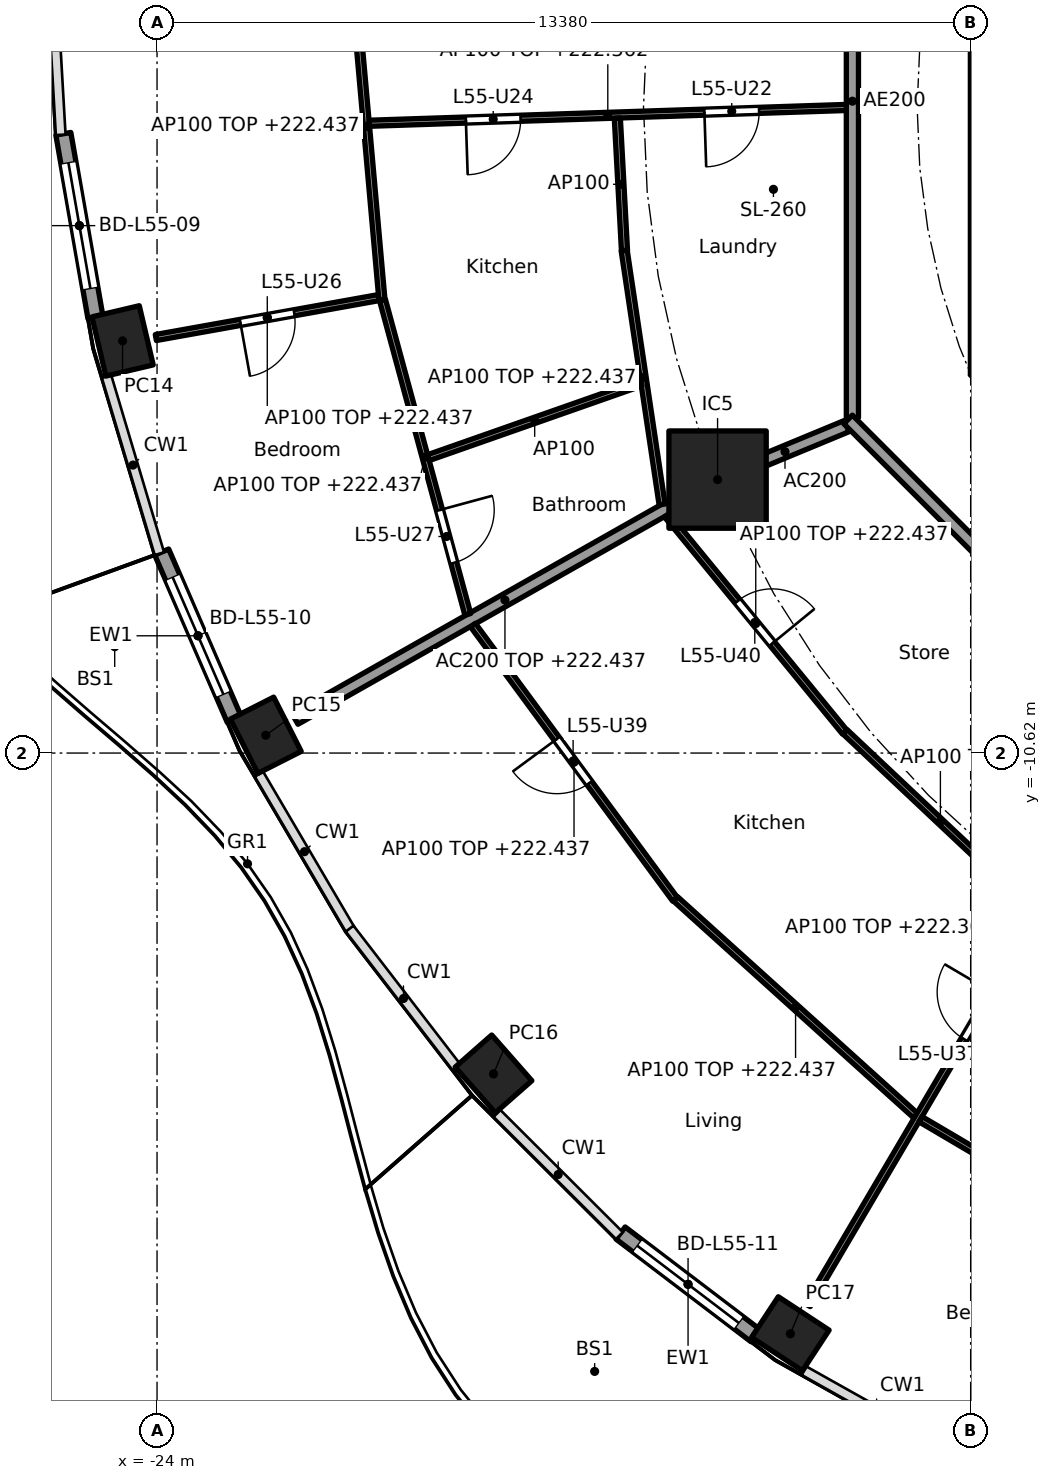
"""IFC4 building model, lengths in metres.
Left out: names, types, materials, properties, quantities, classifications, styles, units other than length and angle.
Written with IfcOpenShell. Run it as: python <this file> out.ifc"""

import sys

from ifc_helpers import new_model, si_unit, direction, frame, frame_2d, origin, origin_2d, place, context, subcontext, project, spatial, polyline, rectangle, hollow_rectangle, outline, extrude, element, fill, save


model = new_model("IFC4")
c1 = context("Model", 3, precision=1e-05, world=origin(), true_north=direction((0.0, 1.0)))
c2 = subcontext(c1, "Body", "Model", "MODEL_VIEW")
j1 = project(units=[si_unit("LENGTHUNIT", "METRE"), si_unit("PLANEANGLEUNIT", "RADIAN")], contexts=[c1])
p1 = place(None, origin())
s1 = spatial("IfcSite", under=j1, at=p1, CompositionType="ELEMENT")
p2 = place(p1, origin())
s2 = spatial("IfcBuilding", under=s1, at=p2, CompositionType="ELEMENT")
p3 = place(p2, frame((0.0, 0.0, 219.6)))
s3 = spatial("IfcBuildingStorey", under=s2, at=p3, CompositionType="ELEMENT", Elevation=219.6)
for number, where, z_axis, x_axis in (
    (1, (-24.567, -3.842, 0.0), (0.0, 0.0, 1.0), (0.229, -0.973, 0.0)),
    (2, (-22.212, -10.327, 0.0), (0.0, 0.0, 1.0), (0.452, -0.892, 0.0)),
    (3, (-18.467, -15.896, 0.0), (0.0, 0.0, 1.0), (0.66, -0.751, 0.0)),
    (4, (-13.585, -20.17, 0.0), (0.0, 0.0, 1.0), (0.836, -0.549, 0.0)),
):
    element("IfcColumn", number, at=place(p3, frame(where, z_axis=z_axis, x_axis=x_axis)), inside=s3, PredefinedType="COLUMN", context=c2, shape_type="SweptSolid", body=[
        extrude(hollow_rectangle(XDim=1.0, YDim=0.8, WallThickness=0.032, at=origin_2d()), origin(), (0.0, 0.0, 1.0), 3.7),
    ])
p4 = place(p3, frame((-14.782, -6.123, 0.0), z_axis=(0.0, 0.0, 1.0), x_axis=(1.0, 0.0, 0.0)))
e5 = element("IfcColumn", 5, at=p4, inside=s3, PredefinedType="COLUMN", context=c2, shape_type="SweptSolid", body=[
    extrude(rectangle(XDim=1.6, YDim=1.6, at=origin_2d()), origin(), (0.0, 0.0, 1.0), 3.7),
])
p5 = place(p3, frame((-25.013, -3.457, 0.0), z_axis=(0.0, 0.0, 1.0), x_axis=(-0.172241318156, 0.985054784426, 0.0)))
e6 = element("IfcWall", 6, at=p5, inside=s3, PredefinedType="SOLIDWALL", context=c2, shape_type="SweptSolid", body=[
    extrude(rectangle(XDim=3.067, YDim=0.25, at=frame_2d((1.534, 0.0))), origin(), (0.0, 0.0, 1.0), 3.44),
])
p6 = place(p5, frame((0.484, 0.0, 0.0)))
e7 = element("IfcOpeningElement", 7, at=p6, cuts=e6, PredefinedType="OPENING", context=c2, shape_type="SweptSolid", body=[
    extrude(rectangle(XDim=2.1, YDim=2.4, at=frame_2d((1.05, 1.2))), frame((0.0, 0.135, 0.0), z_axis=(0.0, -1.0, 0.0), x_axis=(1.0, 0.0, 0.0)), (0.0, 0.0, 1.0), 0.27),
])
p7 = place(p3, frame((-22.729, -10.069, 0.0), z_axis=(0.0, 0.0, 1.0), x_axis=(-0.397655361949, 0.91753485662, 0.0)))
e8 = element("IfcWall", 8, at=p7, inside=s3, PredefinedType="SOLIDWALL", context=c2, shape_type="SweptSolid", body=[
    extrude(rectangle(XDim=3.002, YDim=0.25, at=frame_2d((1.501, 0.0))), origin(), (0.0, 0.0, 1.0), 3.44),
])
p8 = place(p7, frame((0.451, 0.0, 0.0)))
e9 = element("IfcOpeningElement", 9, at=p8, cuts=e8, PredefinedType="OPENING", context=c2, shape_type="SweptSolid", body=[
    extrude(rectangle(XDim=2.1, YDim=2.4, at=frame_2d((1.05, 1.2))), frame((0.0, 0.135, 0.0), z_axis=(0.0, -1.0, 0.0), x_axis=(1.0, 0.0, 0.0)), (0.0, 0.0, 1.0), 0.27),
])
p9 = place(p3, frame((-14.157, -20.201, 0.0), z_axis=(0.0, 0.0, 1.0), x_axis=(-0.795990084031, 0.60530966135, 0.0)))
e10 = element("IfcWall", 10, at=p9, inside=s3, PredefinedType="SOLIDWALL", context=c2, shape_type="SweptSolid", body=[
    extrude(rectangle(XDim=2.789, YDim=0.25, at=frame_2d((1.394, 0.0))), origin(), (0.0, 0.0, 1.0), 3.44),
])
p10 = place(p9, frame((0.344, 0.0, 0.0)))
e11 = element("IfcOpeningElement", 11, at=p10, cuts=e10, PredefinedType="OPENING", context=c2, shape_type="SweptSolid", body=[
    extrude(rectangle(XDim=2.1, YDim=2.4, at=frame_2d((1.05, 1.2))), frame((0.0, 0.135, 0.0), z_axis=(0.0, -1.0, 0.0), x_axis=(1.0, 0.0, 0.0)), (0.0, 0.0, 1.0), 0.27),
])
p11 = place(p3, frame((-10.325, 3.801, 0.0), z_axis=(0.0, 0.0, 1.0), x_axis=(0.0, -1.0, 0.0)))
e12 = element("IfcWall", 12, at=p11, inside=s3, PredefinedType="SHEAR", context=c2, shape_type="SweptSolid", body=[
    extrude(rectangle(XDim=7.602, YDim=0.6, at=frame_2d((3.801, 0.0))), origin(), (0.0, 0.0, 1.0), 3.44),
])
p12 = place(p11, frame((0.651, 0.0, 0.0)))
e13 = element("IfcOpeningElement", 13, at=p12, cuts=e12, PredefinedType="OPENING", context=c2, shape_type="SweptSolid", body=[
    extrude(rectangle(XDim=1.5, YDim=2.1, at=frame_2d((0.75, 1.05))), frame((0.0, 0.31, 0.0), z_axis=(0.0, -1.0, 0.0), x_axis=(1.0, 0.0, 0.0)), (0.0, 0.0, 1.0), 0.62),
])
p13 = place(p11, frame((5.451, 0.0, 0.0)))
e14 = element("IfcOpeningElement", 14, at=p13, cuts=e12, PredefinedType="OPENING", context=c2, shape_type="SweptSolid", body=[
    extrude(rectangle(XDim=1.5, YDim=2.1, at=frame_2d((0.75, 1.05))), frame((0.0, 0.31, 0.0), z_axis=(0.0, -1.0, 0.0), x_axis=(1.0, 0.0, 0.0)), (0.0, 0.0, 1.0), 0.62),
])
p14 = place(p3, origin())
e15 = element("IfcWall", 15, at=p14, inside=s3, PredefinedType="SHEAR", context=c2, shape_type="SweptSolid", body=[
    extrude(outline(polyline([(-10.625, -3.801), (-10.025, -3.801), (-10.025, -4.152), (-9.776, -4.401), (-10.2, -4.825), (-10.625, -4.401), (-10.625, -3.801)])), origin(), (0.0, 0.0, 1.0), 3.44),
])
p15 = place(p3, frame((-12.657, -5.243, 0.0), z_axis=(0.0, 0.0, 1.0), x_axis=(-0.923859888513, -0.38273085373, 0.0)))
e16 = element("IfcWall", 16, at=p15, inside=s3, PredefinedType="PARTITIONING", context=c2, shape_type="SweptSolid", body=[
    extrude(rectangle(XDim=2.199, YDim=0.2, at=frame_2d((1.1, 0.0))), origin(), (0.0, 0.0, 1.0), 3.44),
])
p16 = place(p3, frame((-14.825, -6.148, 0.0), z_axis=(0.0, 0.0, 1.0), x_axis=(-0.870099576105, -0.492875975944, 0.0)))
e17 = element("IfcWall", 17, at=p16, inside=s3, PredefinedType="PARTITIONING", context=c2, shape_type="SweptSolid", body=[
    extrude(rectangle(XDim=7.937, YDim=0.2, at=frame_2d((3.969, 0.0))), origin(), (0.0, 0.0, 1.0), 2.837),
])
p17 = place(p3, frame((-12.565, 5.304, 0.0), z_axis=(0.0, 0.0, 1.0), x_axis=(0.0, -1.0, 0.0)))
e18 = element("IfcWall", 18, at=p17, inside=s3, PredefinedType="PARTITIONING", context=c2, shape_type="SweptSolid", body=[
    extrude(rectangle(XDim=10.409, YDim=0.2, at=frame_2d((5.205, 0.0))), origin(), (0.0, 0.0, 1.0), 3.44),
])
p18 = place(p17, frame((3.07, 0.0, 0.0)))
e19 = element("IfcOpeningElement", 19, at=p18, cuts=e18, PredefinedType="OPENING", context=c2, shape_type="SweptSolid", body=[
    extrude(rectangle(XDim=1.0, YDim=2.1, at=frame_2d((0.5, 1.05))), frame((0.0, 0.11, 0.0), z_axis=(0.0, -1.0, 0.0), x_axis=(1.0, 0.0, 0.0)), (0.0, 0.0, 1.0), 0.22),
])
p19 = place(p3, frame((-12.635, -5.134, 0.0), z_axis=(0.0, 0.0, 1.0), x_axis=(0.707106781187, -0.707106781187, 0.0)))
e20 = element("IfcWall", 20, at=p19, inside=s3, PredefinedType="PARTITIONING", context=c2, shape_type="SweptSolid", body=[
    extrude(rectangle(XDim=10.609, YDim=0.2, at=frame_2d((5.305, 0.0))), origin(), (0.0, 0.0, 1.0), 3.44),
])
p20 = place(p3, frame((-20.81, 2.542, 0.0), z_axis=(0.0, 0.0, 1.0), x_axis=(0.088651453697, -0.996062708748, 0.0)))
e21 = element("IfcWall", 21, at=p20, inside=s3, PredefinedType="PARTITIONING", context=c2, shape_type="SweptSolid", body=[
    extrude(rectangle(XDim=5.737, YDim=0.1, at=frame_2d((2.868, 0.0))), origin(), (0.0, 0.0, 1.0), 2.837),
])
p21 = place(p3, frame((-12.665, -0.003, 0.0), z_axis=(0.0, 0.0, 1.0), x_axis=(-0.999453263957, -0.033063169315, 0.0)))
e22 = element("IfcWall", 22, at=p21, inside=s3, PredefinedType="PARTITIONING", context=c2, shape_type="SweptSolid", body=[
    extrude(rectangle(XDim=7.849, YDim=0.1, at=frame_2d((3.925, 0.0))), origin(), (0.0, 0.0, 1.0), 2.762),
])
p22 = place(p21, frame((1.435, 0.0, 0.0)))
e23 = element("IfcOpeningElement", 23, at=p22, cuts=e22, PredefinedType="OPENING", context=c2, shape_type="SweptSolid", body=[
    extrude(rectangle(XDim=0.9, YDim=2.1, at=frame_2d((0.45, 1.05))), frame((0.0, 0.06, 0.0), z_axis=(0.0, -1.0, 0.0), x_axis=(1.0, 0.0, 0.0)), (0.0, 0.0, 1.0), 0.12),
])
p23 = place(p21, frame((5.36, 0.0, 0.0)))
e24 = element("IfcOpeningElement", 24, at=p23, cuts=e22, PredefinedType="OPENING", context=c2, shape_type="SweptSolid", body=[
    extrude(rectangle(XDim=0.9, YDim=2.1, at=frame_2d((0.45, 1.05))), frame((0.0, 0.06, 0.0), z_axis=(0.0, -1.0, 0.0), x_axis=(1.0, 0.0, 0.0)), (0.0, 0.0, 1.0), 0.12),
])
p24 = place(p3, frame((-16.431, -0.178, 0.0), z_axis=(0.0, 0.0, 1.0), x_axis=(0.053951127036, -0.998543577362, 0.0)))
e25 = element("IfcWall", 25, at=p24, inside=s3, PredefinedType="PARTITIONING", context=c2, shape_type="SweptSolid", body=[
    extrude(rectangle(XDim=2.181, YDim=0.1, at=frame_2d((1.091, 0.0))), origin(), (0.0, 0.0, 1.0), 3.44),
])
p25 = place(p3, frame((-16.318, -2.356, 0.0), z_axis=(0.0, 0.0, 1.0), x_axis=(0.147684413341, -0.989034536331, 0.0)))
e26 = element("IfcWall", 26, at=p25, inside=s3, PredefinedType="PARTITIONING", context=c2, shape_type="SweptSolid", body=[
    extrude(rectangle(XDim=4.222, YDim=0.1, at=frame_2d((2.111, 0.0))), origin(), (0.0, 0.0, 1.0), 2.837),
])
p26 = place(p3, frame((-20.355, -3.13, 0.0), z_axis=(0.0, 0.0, 1.0), x_axis=(-0.984331377639, -0.1763284974, 0.0)))
e27 = element("IfcWall", 27, at=p26, inside=s3, PredefinedType="PARTITIONING", context=c2, shape_type="SweptSolid", body=[
    extrude(rectangle(XDim=3.723, YDim=0.1, at=frame_2d((1.862, 0.0))), origin(), (0.0, 0.0, 1.0), 2.837),
])
p27 = place(p26, frame((1.412, 0.0, 0.0)))
e28 = element("IfcOpeningElement", 28, at=p27, cuts=e27, PredefinedType="OPENING", context=c2, shape_type="SweptSolid", body=[
    extrude(rectangle(XDim=0.9, YDim=2.1, at=frame_2d((0.45, 1.05))), frame((0.0, 0.06, 0.0), z_axis=(0.0, -1.0, 0.0), x_axis=(1.0, 0.0, 0.0)), (0.0, 0.0, 1.0), 0.12),
])
p28 = place(p3, frame((-20.292, -3.17, 0.0), z_axis=(0.0, 0.0, 1.0), x_axis=(0.26187906236, -0.965100697698, 0.0)))
e29 = element("IfcWall", 29, at=p28, inside=s3, PredefinedType="PARTITIONING", context=c2, shape_type="SweptSolid", body=[
    extrude(rectangle(XDim=5.356, YDim=0.1, at=frame_2d((2.678, 0.0))), origin(), (0.0, 0.0, 1.0), 2.837),
])
p29 = place(p28, frame((3.579, 0.0, 0.0)))
e30 = element("IfcOpeningElement", 30, at=p29, cuts=e29, PredefinedType="OPENING", context=c2, shape_type="SweptSolid", body=[
    extrude(rectangle(XDim=0.9, YDim=2.1, at=frame_2d((0.45, 1.05))), frame((0.0, 0.06, 0.0), z_axis=(0.0, -1.0, 0.0), x_axis=(1.0, 0.0, 0.0)), (0.0, 0.0, 1.0), 0.12),
])
p30 = place(p3, frame((-16.042, -4.535, 0.0), z_axis=(0.0, 0.0, 1.0), x_axis=(-0.94358986717, -0.331116539265, 0.0)))
e31 = element("IfcWall", 31, at=p30, inside=s3, PredefinedType="PARTITIONING", context=c2, shape_type="SweptSolid", body=[
    extrude(rectangle(XDim=3.704, YDim=0.1, at=frame_2d((1.852, 0.0))), origin(), (0.0, 0.0, 1.0), 3.44),
])
p31 = place(p3, frame((-15.616, -6.708, 0.0), z_axis=(0.0, 0.0, 1.0), x_axis=(0.634076422357, -0.773270386483, 0.0)))
e32 = element("IfcWall", 32, at=p31, inside=s3, PredefinedType="PARTITIONING", context=c2, shape_type="SweptSolid", body=[
    extrude(rectangle(XDim=4.611, YDim=0.1, at=frame_2d((2.306, 0.0))), origin(), (0.0, 0.0, 1.0), 2.837),
])
p32 = place(p31, frame((1.831, 0.0, 0.0)))
e33 = element("IfcOpeningElement", 33, at=p32, cuts=e32, PredefinedType="OPENING", context=c2, shape_type="SweptSolid", body=[
    extrude(rectangle(XDim=0.9, YDim=2.1, at=frame_2d((0.45, 1.05))), frame((0.0, 0.06, 0.0), z_axis=(0.0, -1.0, 0.0), x_axis=(1.0, 0.0, 0.0)), (0.0, 0.0, 1.0), 0.12),
])
p33 = place(p3, frame((-18.804, -8.516, 0.0), z_axis=(0.0, 0.0, 1.0), x_axis=(0.593249583583, -0.805018590828, 0.0)))
e34 = element("IfcWall", 34, at=p33, inside=s3, PredefinedType="PARTITIONING", context=c2, shape_type="SweptSolid", body=[
    extrude(rectangle(XDim=5.602, YDim=0.1, at=frame_2d((2.801, 0.0))), origin(), (0.0, 0.0, 1.0), 2.837),
])
p34 = place(p33, frame((2.326, 0.0, 0.0)))
e35 = element("IfcOpeningElement", 35, at=p34, cuts=e34, PredefinedType="OPENING", context=c2, shape_type="SweptSolid", body=[
    extrude(rectangle(XDim=0.9, YDim=2.1, at=frame_2d((0.45, 1.05))), frame((0.0, 0.06, 0.0), z_axis=(0.0, -1.0, 0.0), x_axis=(1.0, 0.0, 0.0)), (0.0, 0.0, 1.0), 0.12),
])
p35 = place(p3, frame((-12.688, -10.27, 0.0), z_axis=(0.0, 0.0, 1.0), x_axis=(0.728268142903, -0.685292282192, 0.0)))
e36 = element("IfcWall", 36, at=p35, inside=s3, PredefinedType="PARTITIONING", context=c2, shape_type="SweptSolid", body=[
    extrude(rectangle(XDim=4.312, YDim=0.1, at=frame_2d((2.156, 0.0))), origin(), (0.0, 0.0, 1.0), 2.837),
])
p36 = place(p3, frame((-15.474, -13.019, 0.0), z_axis=(0.0, 0.0, 1.0), x_axis=(0.742348572616, -0.670013878017, 0.0)))
e37 = element("IfcWall", 37, at=p36, inside=s3, PredefinedType="PARTITIONING", context=c2, shape_type="SweptSolid", body=[
    extrude(rectangle(XDim=5.319, YDim=0.1, at=frame_2d((2.66, 0.0))), origin(), (0.0, 0.0, 1.0), 2.837),
])
p37 = place(p3, frame((-7.709, -10.198, 0.0), z_axis=(0.0, 0.0, 1.0), x_axis=(-0.507355901053, -0.8617366127, 0.0)))
e38 = element("IfcWall", 38, at=p37, inside=s3, PredefinedType="PARTITIONING", context=c2, shape_type="SweptSolid", body=[
    extrude(rectangle(XDim=11.025, YDim=0.1, at=frame_2d((5.512, 0.0))), origin(), (0.0, 0.0, 1.0), 2.762),
])
p38 = place(p37, frame((5.05, 0.0, 0.0)))
e39 = element("IfcOpeningElement", 39, at=p38, cuts=e38, PredefinedType="OPENING", context=c2, shape_type="SweptSolid", body=[
    extrude(rectangle(XDim=0.9, YDim=2.1, at=frame_2d((0.45, 1.05))), frame((0.0, 0.06, 0.0), z_axis=(0.0, -1.0, 0.0), x_axis=(1.0, 0.0, 0.0)), (0.0, 0.0, 1.0), 0.12),
])
p39 = place(p3, frame((-11.445, -16.641, 0.0), z_axis=(0.0, 0.0, 1.0), x_axis=(0.861562560957, -0.507651409489, 0.0)))
e40 = element("IfcWall", 40, at=p39, inside=s3, PredefinedType="PARTITIONING", context=c2, shape_type="SweptSolid", body=[
    extrude(rectangle(XDim=4.985, YDim=0.1, at=frame_2d((2.492, 0.0))), origin(), (0.0, 0.0, 1.0), 2.837),
])
p40 = place(p39, frame((2.042, 0.0, 0.0)))
e41 = element("IfcOpeningElement", 41, at=p40, cuts=e40, PredefinedType="OPENING", context=c2, shape_type="SweptSolid", body=[
    extrude(rectangle(XDim=0.9, YDim=2.1, at=frame_2d((0.45, 1.05))), frame((0.0, 0.06, 0.0), z_axis=(0.0, -1.0, 0.0), x_axis=(1.0, 0.0, 0.0)), (0.0, 0.0, 1.0), 0.12),
])
p41 = place(p6, origin())
e42 = element("IfcDoor", 42, at=p41, inside=s3, OperationType="SLIDING_TO_LEFT", PredefinedType="DOOR", context=c2, shape_type="SweptSolid", body=[
    extrude(rectangle(XDim=2.1, YDim=2.4, at=frame_2d((1.05, 1.2))), frame((0.0, 0.025, 0.0), z_axis=(0.0, -1.0, 0.0), x_axis=(1.0, 0.0, 0.0)), (0.0, 0.0, 1.0), 0.05),
])
fill(e7, e42)
p42 = place(p8, origin())
e43 = element("IfcDoor", 43, at=p42, inside=s3, OperationType="SLIDING_TO_LEFT", PredefinedType="DOOR", context=c2, shape_type="SweptSolid", body=[
    extrude(rectangle(XDim=2.1, YDim=2.4, at=frame_2d((1.05, 1.2))), frame((0.0, 0.025, 0.0), z_axis=(0.0, -1.0, 0.0), x_axis=(1.0, 0.0, 0.0)), (0.0, 0.0, 1.0), 0.05),
])
fill(e9, e43)
p43 = place(p10, origin())
e44 = element("IfcDoor", 44, at=p43, inside=s3, OperationType="SLIDING_TO_LEFT", PredefinedType="DOOR", context=c2, shape_type="SweptSolid", body=[
    extrude(rectangle(XDim=2.1, YDim=2.4, at=frame_2d((1.05, 1.2))), frame((0.0, 0.025, 0.0), z_axis=(0.0, -1.0, 0.0), x_axis=(1.0, 0.0, 0.0)), (0.0, 0.0, 1.0), 0.05),
])
fill(e11, e44)
p44 = place(p22, origin())
e45 = element("IfcDoor", 45, at=p44, inside=s3, OperationType="SINGLE_SWING_RIGHT", PredefinedType="DOOR", context=c2, shape_type="SweptSolid", body=[
    extrude(rectangle(XDim=0.9, YDim=2.1, at=frame_2d((0.45, 1.05))), frame((0.0, 0.025, 0.0), z_axis=(0.0, -1.0, 0.0), x_axis=(1.0, 0.0, 0.0)), (0.0, 0.0, 1.0), 0.05),
])
fill(e23, e45)
p45 = place(p23, origin())
e46 = element("IfcDoor", 46, at=p45, inside=s3, OperationType="SINGLE_SWING_RIGHT", PredefinedType="DOOR", context=c2, shape_type="SweptSolid", body=[
    extrude(rectangle(XDim=0.9, YDim=2.1, at=frame_2d((0.45, 1.05))), frame((0.0, 0.025, 0.0), z_axis=(0.0, -1.0, 0.0), x_axis=(1.0, 0.0, 0.0)), (0.0, 0.0, 1.0), 0.05),
])
fill(e24, e46)
p46 = place(p27, origin())
e47 = element("IfcDoor", 47, at=p46, inside=s3, OperationType="SINGLE_SWING_RIGHT", PredefinedType="DOOR", context=c2, shape_type="SweptSolid", body=[
    extrude(rectangle(XDim=0.9, YDim=2.1, at=frame_2d((0.45, 1.05))), frame((0.0, 0.025, 0.0), z_axis=(0.0, -1.0, 0.0), x_axis=(1.0, 0.0, 0.0)), (0.0, 0.0, 1.0), 0.05),
])
fill(e28, e47)
p47 = place(p29, origin())
e48 = element("IfcDoor", 48, at=p47, inside=s3, OperationType="SINGLE_SWING_LEFT", PredefinedType="DOOR", context=c2, shape_type="SweptSolid", body=[
    extrude(rectangle(XDim=0.9, YDim=2.1, at=frame_2d((0.45, 1.05))), frame((0.0, 0.025, 0.0), z_axis=(0.0, -1.0, 0.0), x_axis=(1.0, 0.0, 0.0)), (0.0, 0.0, 1.0), 0.05),
])
fill(e30, e48)
p48 = place(p38, frame((0.9, 0.0, 0.0), x_axis=(-1.0, 0.0, 0.0)))
e49 = element("IfcDoor", 49, at=p48, inside=s3, OperationType="SINGLE_SWING_RIGHT", PredefinedType="DOOR", context=c2, shape_type="SweptSolid", body=[
    extrude(rectangle(XDim=0.9, YDim=2.1, at=frame_2d((0.45, 1.05))), frame((0.0, 0.025, 0.0), z_axis=(0.0, -1.0, 0.0), x_axis=(1.0, 0.0, 0.0)), (0.0, 0.0, 1.0), 0.05),
])
fill(e39, e49)
p49 = place(p34, frame((0.9, 0.0, 0.0), x_axis=(-1.0, 0.0, 0.0)))
e50 = element("IfcDoor", 50, at=p49, inside=s3, OperationType="SINGLE_SWING_RIGHT", PredefinedType="DOOR", context=c2, shape_type="SweptSolid", body=[
    extrude(rectangle(XDim=0.9, YDim=2.1, at=frame_2d((0.45, 1.05))), frame((0.0, 0.025, 0.0), z_axis=(0.0, -1.0, 0.0), x_axis=(1.0, 0.0, 0.0)), (0.0, 0.0, 1.0), 0.05),
])
fill(e35, e50)
p50 = place(p32, origin())
e51 = element("IfcDoor", 51, at=p50, inside=s3, OperationType="SINGLE_SWING_RIGHT", PredefinedType="DOOR", context=c2, shape_type="SweptSolid", body=[
    extrude(rectangle(XDim=0.9, YDim=2.1, at=frame_2d((0.45, 1.05))), frame((0.0, 0.025, 0.0), z_axis=(0.0, -1.0, 0.0), x_axis=(1.0, 0.0, 0.0)), (0.0, 0.0, 1.0), 0.05),
])
fill(e33, e51)
save(model, sys.argv[1])
